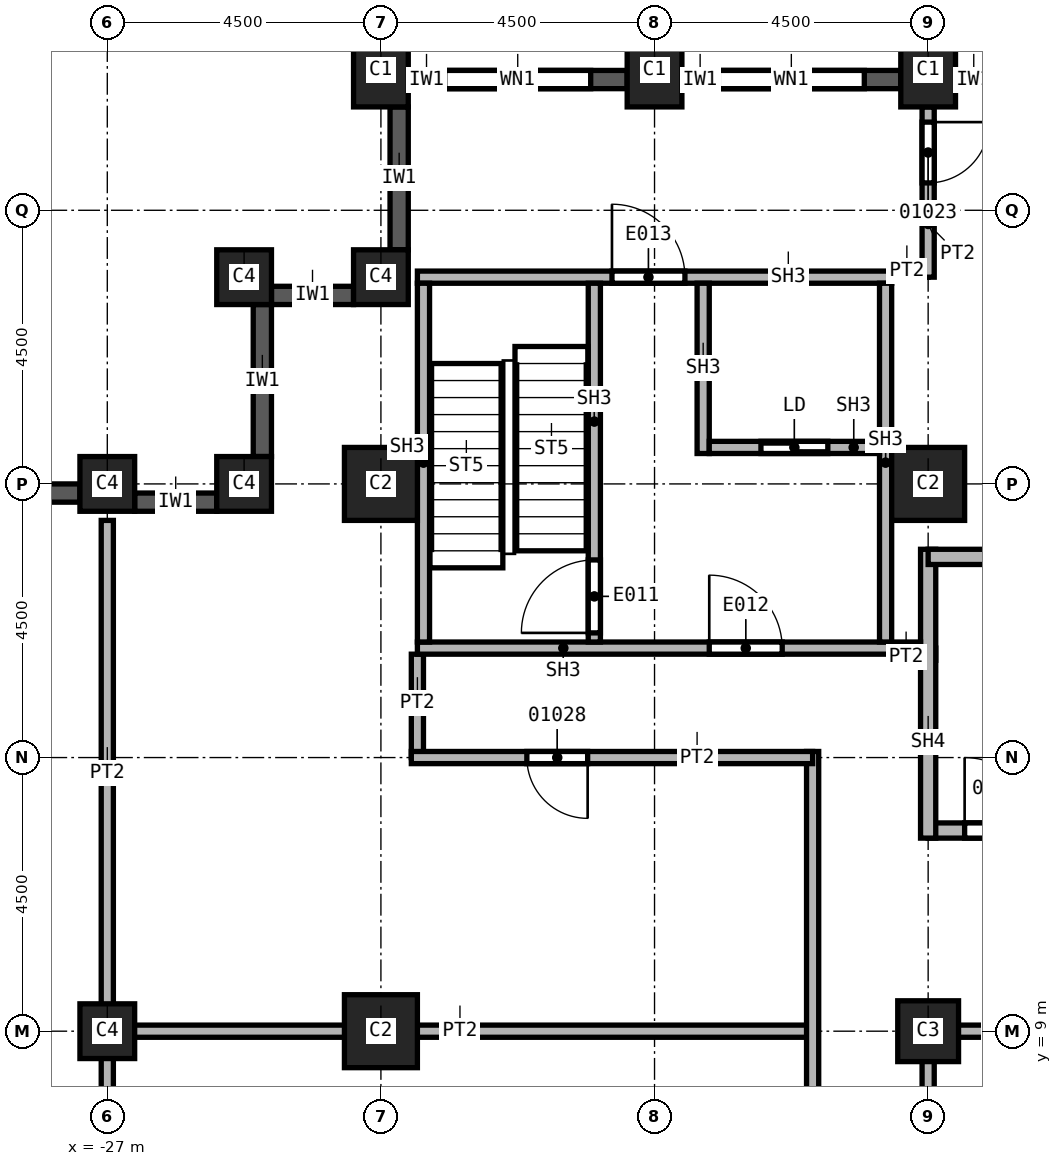
"""IFC4 building model, lengths in metres.
Left out: names, types, materials, properties, quantities, classifications, styles, units other than length and angle.
Written with IfcOpenShell. Run it as: python <this file> out.ifc"""

import sys

from ifc_helpers import new_model, si_unit, direction, frame, frame_2d, origin, origin_2d, place, context, subcontext, project, spatial, rectangle, extrude, element, fill, save


model = new_model("IFC4")
c1 = context("Model", 3, precision=1e-05, world=origin(), true_north=direction((0.0, 1.0)))
c2 = subcontext(c1, "Body", "Model", "MODEL_VIEW")
j1 = project(units=[si_unit("LENGTHUNIT", "METRE"), si_unit("PLANEANGLEUNIT", "RADIAN")], contexts=[c1])
p1 = place(None, origin())
s1 = spatial("IfcSite", under=j1, at=p1, CompositionType="ELEMENT")
p2 = place(p1, origin())
s2 = spatial("IfcBuilding", under=s1, at=p2, CompositionType="ELEMENT")
p3 = place(p2, frame((0.0, 0.0, 72.0)))
s3 = spatial("IfcBuildingStorey", under=s2, at=p3, CompositionType="ELEMENT", Elevation=72.0)
for number, where, z_axis, x_axis in (
    (1, (-13.5, 18.0, 0.0), (0.0, 0.0, 1.0), (1.0, 0.0, 0.0)),
    (2, (-22.5, 9.0, 0.0), (0.0, 0.0, 1.0), (1.0, 0.0, 0.0)),
    (3, (-22.5, 18.0, 0.0), (0.0, 0.0, 1.0), (1.0, 0.0, 0.0)),
):
    element("IfcColumn", number, at=place(p3, frame(where, z_axis=z_axis, x_axis=x_axis)), inside=s3, PredefinedType="COLUMN", context=c2, shape_type="SweptSolid", body=[
        extrude(rectangle(XDim=1.2, YDim=1.2, at=origin_2d()), origin(), (0.0, 0.0, 1.0), 3.7),
    ])
p4 = place(p3, frame((-13.5, 9.0, 0.0), z_axis=(0.0, 0.0, 1.0), x_axis=(1.0, 0.0, 0.0)))
e4 = element("IfcColumn", 4, at=p4, inside=s3, PredefinedType="COLUMN", context=c2, shape_type="SweptSolid", body=[
    extrude(rectangle(XDim=1.0, YDim=1.0, at=origin_2d()), origin(), (0.0, 0.0, 1.0), 3.7),
])
for number, where, z_axis, x_axis in (
    (5, (-13.5, 24.8, 0.0), (0.0, 0.0, 1.0), (1.0, 0.0, 0.0)),
    (6, (-18.0, 24.8, 0.0), (0.0, 0.0, 1.0), (1.0, 0.0, 0.0)),
    (7, (-22.5, 24.8, 0.0), (0.0, 0.0, 1.0), (1.0, 0.0, 0.0)),
):
    element("IfcColumn", number, at=place(p3, frame(where, z_axis=z_axis, x_axis=x_axis)), inside=s3, PredefinedType="COLUMN", context=c2, shape_type="SweptSolid", body=[
        extrude(rectangle(XDim=0.9, YDim=1.2, at=origin_2d()), origin(), (0.0, 0.0, 1.0), 3.7),
    ])
for number, where, z_axis, x_axis in (
    (8, (-27.0, 9.0, 0.0), (0.0, 0.0, 1.0), (1.0, 0.0, 0.0)),
    (9, (-27.0, 18.0, 0.0), (0.0, 0.0, 1.0), (1.0, 0.0, 0.0)),
    (10, (-22.5, 21.4, 0.0), (0.0, 0.0, 1.0), (1.0, 0.0, 0.0)),
    (11, (-24.75, 21.4, 0.0), (0.0, 0.0, 1.0), (1.0, 0.0, 0.0)),
    (12, (-24.75, 18.0, 0.0), (0.0, 0.0, 1.0), (1.0, 0.0, 0.0)),
):
    element("IfcColumn", number, at=place(p3, frame(where, z_axis=z_axis, x_axis=x_axis)), inside=s3, PredefinedType="COLUMN", context=c2, shape_type="SweptSolid", body=[
        extrude(rectangle(XDim=0.9, YDim=0.9, at=origin_2d()), origin(), (0.0, 0.0, 1.0), 3.7),
    ])
p5 = place(p3, frame((-22.2, 24.2, 0.0), z_axis=(0.0, 0.0, 1.0), x_axis=(0.0, -1.0, 0.0)))
e13 = element("IfcWall", 13, at=p5, inside=s3, PredefinedType="SOLIDWALL", context=c2, shape_type="SweptSolid", body=[
    extrude(rectangle(XDim=2.35, YDim=0.3, at=frame_2d((1.175, 0.0))), origin(), (0.0, 0.0, 1.0), 3.1),
])
p6 = place(p3, frame((-22.95, 21.1, 0.0), z_axis=(0.0, 0.0, 1.0), x_axis=(-1.0, 0.0, 0.0)))
e14 = element("IfcWall", 14, at=p6, inside=s3, PredefinedType="SOLIDWALL", context=c2, shape_type="SweptSolid", body=[
    extrude(rectangle(XDim=1.35, YDim=0.3, at=frame_2d((0.675, 0.0))), origin(), (0.0, 0.0, 1.0), 3.1),
])
p7 = place(p3, frame((-24.45, 20.95, 0.0), z_axis=(0.0, 0.0, 1.0), x_axis=(0.0, -1.0, 0.0)))
e15 = element("IfcWall", 15, at=p7, inside=s3, PredefinedType="SOLIDWALL", context=c2, shape_type="SweptSolid", body=[
    extrude(rectangle(XDim=2.5, YDim=0.3, at=frame_2d((1.25, 0.0))), origin(), (0.0, 0.0, 1.0), 3.1),
])
p8 = place(p3, frame((-25.2, 17.7, 0.0), z_axis=(0.0, 0.0, 1.0), x_axis=(-1.0, 0.0, 0.0)))
e16 = element("IfcWall", 16, at=p8, inside=s3, PredefinedType="SOLIDWALL", context=c2, shape_type="SweptSolid", body=[
    extrude(rectangle(XDim=1.35, YDim=0.3, at=frame_2d((0.675, 0.0))), origin(), (0.0, 0.0, 1.0), 3.1),
])
p9 = place(p3, frame((-27.45, 17.85, 0.0), z_axis=(0.0, 0.0, 1.0), x_axis=(-1.0, 0.0, 0.0)))
e17 = element("IfcWall", 17, at=p9, inside=s3, PredefinedType="SOLIDWALL", context=c2, shape_type="SweptSolid", body=[
    extrude(rectangle(XDim=3.6, YDim=0.3, at=frame_2d((1.8, 0.0))), origin(), (0.0, 0.0, 1.0), 3.1),
])
p10 = place(p9, frame((0.6, 0.0, 0.8)))
e18 = element("IfcOpeningElement", 18, at=p10, cuts=e17, PredefinedType="OPENING", context=c2, shape_type="SweptSolid", body=[
    extrude(rectangle(XDim=2.4, YDim=1.95, at=frame_2d((1.2, 0.975))), frame((0.0, 0.15, 0.0), z_axis=(0.0, -1.0, 0.0), x_axis=(1.0, 0.0, 0.0)), (0.0, 0.0, 1.0), 0.3),
])
p11 = place(p3, frame((-9.45, 24.65, 0.0), z_axis=(0.0, 0.0, 1.0), x_axis=(-1.0, 0.0, 0.0)))
e19 = element("IfcWall", 19, at=p11, inside=s3, PredefinedType="SOLIDWALL", context=c2, shape_type="SweptSolid", body=[
    extrude(rectangle(XDim=3.6, YDim=0.3, at=frame_2d((1.8, 0.0))), origin(), (0.0, 0.0, 1.0), 3.1),
])
p12 = place(p11, frame((0.6, 0.0, 0.8)))
e20 = element("IfcOpeningElement", 20, at=p12, cuts=e19, PredefinedType="OPENING", context=c2, shape_type="SweptSolid", body=[
    extrude(rectangle(XDim=2.4, YDim=1.95, at=frame_2d((1.2, 0.975))), frame((0.0, 0.15, 0.0), z_axis=(0.0, -1.0, 0.0), x_axis=(1.0, 0.0, 0.0)), (0.0, 0.0, 1.0), 0.3),
])
p13 = place(p3, frame((-13.95, 24.65, 0.0), z_axis=(0.0, 0.0, 1.0), x_axis=(-1.0, 0.0, 0.0)))
e21 = element("IfcWall", 21, at=p13, inside=s3, PredefinedType="SOLIDWALL", context=c2, shape_type="SweptSolid", body=[
    extrude(rectangle(XDim=3.6, YDim=0.3, at=frame_2d((1.8, 0.0))), origin(), (0.0, 0.0, 1.0), 3.1),
])
p14 = place(p13, frame((0.6, 0.0, 0.8)))
e22 = element("IfcOpeningElement", 22, at=p14, cuts=e21, PredefinedType="OPENING", context=c2, shape_type="SweptSolid", body=[
    extrude(rectangle(XDim=2.4, YDim=1.95, at=frame_2d((1.2, 0.975))), frame((0.0, 0.15, 0.0), z_axis=(0.0, -1.0, 0.0), x_axis=(1.0, 0.0, 0.0)), (0.0, 0.0, 1.0), 0.3),
])
p15 = place(p3, frame((-18.45, 24.65, 0.0), z_axis=(0.0, 0.0, 1.0), x_axis=(-1.0, 0.0, 0.0)))
e23 = element("IfcWall", 23, at=p15, inside=s3, PredefinedType="SOLIDWALL", context=c2, shape_type="SweptSolid", body=[
    extrude(rectangle(XDim=3.6, YDim=0.3, at=frame_2d((1.8, 0.0))), origin(), (0.0, 0.0, 1.0), 3.1),
])
p16 = place(p15, frame((0.6, 0.0, 0.8)))
e24 = element("IfcOpeningElement", 24, at=p16, cuts=e23, PredefinedType="OPENING", context=c2, shape_type="SweptSolid", body=[
    extrude(rectangle(XDim=2.4, YDim=1.95, at=frame_2d((1.2, 0.975))), frame((0.0, 0.15, 0.0), z_axis=(0.0, -1.0, 0.0), x_axis=(1.0, 0.0, 0.0)), (0.0, 0.0, 1.0), 0.3),
])
p17 = place(p3, frame((-27.1, 9.0, 0.0), z_axis=(0.0, 0.0, 1.0), x_axis=(1.0, 0.0, 0.0)))
e25 = element("IfcWall", 25, at=p17, inside=s3, PredefinedType="PARTITIONING", context=c2, shape_type="SweptSolid", body=[
    extrude(rectangle(XDim=11.7, YDim=0.2, at=frame_2d((5.85, 0.0))), origin(), (0.0, 0.0, 1.0), 3.7),
])
p18 = place(p3, frame((-27.0, 3.75, 0.0), z_axis=(0.0, 0.0, 1.0), x_axis=(0.0, 1.0, 0.0)))
e26 = element("IfcWall", 26, at=p18, inside=s3, PredefinedType="PARTITIONING", context=c2, shape_type="SweptSolid", body=[
    extrude(rectangle(XDim=13.65, YDim=0.2, at=frame_2d((6.825, 0.0))), origin(), (0.0, 0.0, 1.0), 3.7),
])
p19 = place(p3, frame((-21.9, 13.5, 0.0), z_axis=(0.0, 0.0, 1.0), x_axis=(0.0, 1.0, 0.0)))
e27 = element("IfcWall", 27, at=p19, inside=s3, PredefinedType="PARTITIONING", context=c2, shape_type="SweptSolid", body=[
    extrude(rectangle(XDim=1.7, YDim=0.2, at=frame_2d((0.85, 0.0))), origin(), (0.0, 0.0, 1.0), 3.7),
])
p20 = place(p3, frame((-15.4, 3.65, 0.0), z_axis=(0.0, 0.0, 1.0), x_axis=(0.0, 1.0, 0.0)))
e28 = element("IfcWall", 28, at=p20, inside=s3, PredefinedType="PARTITIONING", context=c2, shape_type="SweptSolid", body=[
    extrude(rectangle(XDim=9.95, YDim=0.2, at=frame_2d((4.975, 0.0))), origin(), (0.0, 0.0, 1.0), 3.7),
])
p21 = place(p3, frame((-15.4, 13.5, 0.0), z_axis=(0.0, 0.0, 1.0), x_axis=(-1.0, 0.0, 0.0)))
e29 = element("IfcWall", 29, at=p21, inside=s3, PredefinedType="PARTITIONING", context=c2, shape_type="SweptSolid", body=[
    extrude(rectangle(XDim=6.6, YDim=0.2, at=frame_2d((3.3, 0.0))), origin(), (0.0, 0.0, 1.0), 3.7),
])
p22 = place(p21, frame((3.7, 0.0, 0.0)))
e30 = element("IfcOpeningElement", 30, at=p22, cuts=e29, PredefinedType="OPENING", context=c2, shape_type="SweptSolid", body=[
    extrude(rectangle(XDim=1.0, YDim=2.1, at=frame_2d((0.5, 1.05))), frame((0.0, 0.1, 0.0), z_axis=(0.0, -1.0, 0.0), x_axis=(1.0, 0.0, 0.0)), (0.0, 0.0, 1.0), 0.2),
])
p23 = place(p3, frame((-14.1, 15.2, 0.0), z_axis=(0.0, 0.0, 1.0), x_axis=(1.0, 0.0, 0.0)))
e31 = element("IfcWall", 31, at=p23, inside=s3, PredefinedType="PARTITIONING", context=c2, shape_type="SweptSolid", body=[
    extrude(rectangle(XDim=0.725, YDim=0.2, at=frame_2d((0.363, 0.0))), origin(), (0.0, 0.0, 1.0), 3.7),
])
p24 = place(p3, frame((-13.5, 21.5, 0.0), z_axis=(0.0, 0.0, 1.0), x_axis=(-1.0, 0.0, 0.0)))
e32 = element("IfcWall", 32, at=p24, inside=s3, PredefinedType="PARTITIONING", context=c2, shape_type="SweptSolid", body=[
    extrude(rectangle(XDim=0.6, YDim=0.2, at=frame_2d((0.3, 0.0))), origin(), (0.0, 0.0, 1.0), 3.7),
])
p25 = place(p3, frame((-13.5, 24.2, 0.0), z_axis=(0.0, 0.0, 1.0), x_axis=(0.0, -1.0, 0.0)))
e33 = element("IfcWall", 33, at=p25, inside=s3, PredefinedType="PARTITIONING", context=c2, shape_type="SweptSolid", body=[
    extrude(rectangle(XDim=2.8, YDim=0.2, at=frame_2d((1.4, 0.0))), origin(), (0.0, 0.0, 1.0), 3.7),
])
p26 = place(p25, frame((0.25, 0.0, 0.0)))
e34 = element("IfcOpeningElement", 34, at=p26, cuts=e33, PredefinedType="OPENING", context=c2, shape_type="SweptSolid", body=[
    extrude(rectangle(XDim=1.0, YDim=2.1, at=frame_2d((0.5, 1.05))), frame((0.0, 0.1, 0.0), z_axis=(0.0, -1.0, 0.0), x_axis=(1.0, 0.0, 0.0)), (0.0, 0.0, 1.0), 0.2),
])
p27 = place(p3, frame((-13.5, 5.0, 0.0), z_axis=(0.0, 0.0, 1.0), x_axis=(0.0, 1.0, 0.0)))
e35 = element("IfcWall", 35, at=p27, inside=s3, PredefinedType="SOLIDWALL", context=c2, shape_type="SweptSolid", body=[
    extrude(rectangle(XDim=4.1, YDim=0.2, at=frame_2d((2.05, 0.0))), origin(), (0.0, 0.0, 1.0), 2.938),
])
p28 = place(p3, frame((-13.5, 9.0, 0.0), z_axis=(0.0, 0.0, 1.0), x_axis=(1.0, 0.0, 0.0)))
e36 = element("IfcWall", 36, at=p28, inside=s3, PredefinedType="SOLIDWALL", context=c2, shape_type="SweptSolid", body=[
    extrude(rectangle(XDim=3.0, YDim=0.2, at=frame_2d((1.5, 0.0))), origin(), (0.0, 0.0, 1.0), 2.938),
])
p29 = place(p3, frame((-13.5, 12.3, 0.0), z_axis=(0.0, 0.0, 1.0), x_axis=(1.0, 0.0, 0.0)))
e37 = element("IfcWall", 37, at=p29, inside=s3, PredefinedType="SOLIDWALL", context=c2, shape_type="SweptSolid", body=[
    extrude(rectangle(XDim=9.125, YDim=0.25, at=frame_2d((4.562, 0.0))), origin(), (0.0, 0.0, 1.0), 3.7),
])
p30 = place(p29, frame((0.6, 0.0, 0.0)))
e38 = element("IfcOpeningElement", 38, at=p30, cuts=e37, PredefinedType="OPENING", context=c2, shape_type="SweptSolid", body=[
    extrude(rectangle(XDim=1.2, YDim=2.1, at=frame_2d((0.6, 1.05))), frame((0.0, 0.125, 0.0), z_axis=(0.0, -1.0, 0.0), x_axis=(1.0, 0.0, 0.0)), (0.0, 0.0, 1.0), 0.25),
])
p31 = place(p3, frame((-13.5, 12.175, 0.0), z_axis=(0.0, 0.0, 1.0), x_axis=(0.0, 1.0, 0.0)))
e39 = element("IfcWall", 39, at=p31, inside=s3, PredefinedType="SOLIDWALL", context=c2, shape_type="SweptSolid", body=[
    extrude(rectangle(XDim=4.75, YDim=0.25, at=frame_2d((2.375, 0.0))), origin(), (0.0, 0.0, 1.0), 3.7),
])
p32 = place(p3, frame((-13.5, 16.8, 0.0), z_axis=(0.0, 0.0, 1.0), x_axis=(1.0, 0.0, 0.0)))
e40 = element("IfcWall", 40, at=p32, inside=s3, PredefinedType="SOLIDWALL", context=c2, shape_type="SweptSolid", body=[
    extrude(rectangle(XDim=9.125, YDim=0.25, at=frame_2d((4.562, 0.0))), origin(), (0.0, 0.0, 1.0), 3.7),
])
p33 = place(p3, frame((-21.9, 15.3, 0.0), z_axis=(0.0, 0.0, 1.0), x_axis=(1.0, 0.0, 0.0)))
e41 = element("IfcWall", 41, at=p33, inside=s3, PredefinedType="SOLIDWALL", context=c2, shape_type="SweptSolid", body=[
    extrude(rectangle(XDim=8.275, YDim=0.2, at=frame_2d((4.137, 0.0))), origin(), (0.0, 0.0, 1.0), 3.7),
])
p34 = place(p33, frame((4.8, 0.0, 0.0)))
e42 = element("IfcOpeningElement", 42, at=p34, cuts=e41, PredefinedType="OPENING", context=c2, shape_type="SweptSolid", body=[
    extrude(rectangle(XDim=1.2, YDim=2.1, at=frame_2d((0.6, 1.05))), frame((0.0, 0.1, 0.0), z_axis=(0.0, -1.0, 0.0), x_axis=(1.0, 0.0, 0.0)), (0.0, 0.0, 1.0), 0.2),
])
p35 = place(p3, frame((-21.9, 21.4, 0.0), z_axis=(0.0, 0.0, 1.0), x_axis=(1.0, 0.0, 0.0)))
e43 = element("IfcWall", 43, at=p35, inside=s3, PredefinedType="SOLIDWALL", context=c2, shape_type="SweptSolid", body=[
    extrude(rectangle(XDim=7.8, YDim=0.2, at=frame_2d((3.9, 0.0))), origin(), (0.0, 0.0, 1.0), 3.7),
])
p36 = place(p35, frame((3.2, 0.0, 0.0)))
e44 = element("IfcOpeningElement", 44, at=p36, cuts=e43, PredefinedType="OPENING", context=c2, shape_type="SweptSolid", body=[
    extrude(rectangle(XDim=1.2, YDim=2.1, at=frame_2d((0.6, 1.05))), frame((0.0, 0.1, 0.0), z_axis=(0.0, -1.0, 0.0), x_axis=(1.0, 0.0, 0.0)), (0.0, 0.0, 1.0), 0.2),
])
for number, where, z_axis, x_axis in (
    (45, (-21.8, 15.4, 0.0), (0.0, 0.0, 1.0), (0.0, 1.0, 0.0)),
    (46, (-14.2, 15.4, 0.0), (0.0, 0.0, 1.0), (0.0, 1.0, 0.0)),
):
    element("IfcWall", number, at=place(p3, frame(where, z_axis=z_axis, x_axis=x_axis)), inside=s3, PredefinedType="SOLIDWALL", context=c2, shape_type="SweptSolid", body=[
        extrude(rectangle(XDim=5.9, YDim=0.2, at=frame_2d((2.95, 0.0))), origin(), (0.0, 0.0, 1.0), 3.7),
    ])
p37 = place(p3, frame((-18.99, 15.4, 0.0), z_axis=(0.0, 0.0, 1.0), x_axis=(0.0, 1.0, 0.0)))
e47 = element("IfcWall", 47, at=p37, inside=s3, PredefinedType="SOLIDWALL", context=c2, shape_type="SweptSolid", body=[
    extrude(rectangle(XDim=5.9, YDim=0.2, at=frame_2d((2.95, 0.0))), origin(), (0.0, 0.0, 1.0), 3.7),
])
p38 = place(p37, frame((0.15, 0.0, 0.0)))
e48 = element("IfcOpeningElement", 48, at=p38, cuts=e47, PredefinedType="OPENING", context=c2, shape_type="SweptSolid", body=[
    extrude(rectangle(XDim=1.2, YDim=2.1, at=frame_2d((0.6, 1.05))), frame((0.0, 0.1, 0.0), z_axis=(0.0, -1.0, 0.0), x_axis=(1.0, 0.0, 0.0)), (0.0, 0.0, 1.0), 0.2),
])
p39 = place(p3, frame((-17.2, 18.5, 0.0), z_axis=(0.0, 0.0, 1.0), x_axis=(0.0, 1.0, 0.0)))
e49 = element("IfcWall", 49, at=p39, inside=s3, PredefinedType="SOLIDWALL", context=c2, shape_type="SweptSolid", body=[
    extrude(rectangle(XDim=2.8, YDim=0.2, at=frame_2d((1.4, 0.0))), origin(), (0.0, 0.0, 1.0), 3.7),
])
p40 = place(p3, frame((-17.1, 18.6, 0.0), z_axis=(0.0, 0.0, 1.0), x_axis=(1.0, 0.0, 0.0)))
e50 = element("IfcWall", 50, at=p40, inside=s3, PredefinedType="SOLIDWALL", context=c2, shape_type="SweptSolid", body=[
    extrude(rectangle(XDim=2.8, YDim=0.2, at=frame_2d((1.4, 0.0))), origin(), (0.0, 0.0, 1.0), 3.7),
])
p41 = place(p40, frame((0.85, 0.0, 0.0)))
e51 = element("IfcOpeningElement", 51, at=p41, cuts=e50, PredefinedType="OPENING", context=c2, shape_type="SweptSolid", body=[
    extrude(rectangle(XDim=1.1, YDim=2.1, at=frame_2d((0.55, 1.05))), frame((0.0, 0.1, 0.0), z_axis=(0.0, -1.0, 0.0), x_axis=(1.0, 0.0, 0.0)), (0.0, 0.0, 1.0), 0.2),
])
p42 = place(p14, origin())
e52 = element("IfcWindow", 52, at=p42, inside=s3, PartitioningType="SINGLE_PANEL", PredefinedType="WINDOW", context=c2, shape_type="SweptSolid", body=[
    extrude(rectangle(XDim=2.4, YDim=1.95, at=frame_2d((1.2, 0.975))), frame((0.0, 0.03, 0.0), z_axis=(0.0, -1.0, 0.0), x_axis=(1.0, 0.0, 0.0)), (0.0, 0.0, 1.0), 0.06),
])
fill(e22, e52)
p43 = place(p16, origin())
e53 = element("IfcWindow", 53, at=p43, inside=s3, PartitioningType="SINGLE_PANEL", PredefinedType="WINDOW", context=c2, shape_type="SweptSolid", body=[
    extrude(rectangle(XDim=2.4, YDim=1.95, at=frame_2d((1.2, 0.975))), frame((0.0, 0.03, 0.0), z_axis=(0.0, -1.0, 0.0), x_axis=(1.0, 0.0, 0.0)), (0.0, 0.0, 1.0), 0.06),
])
fill(e24, e53)
p44 = place(p30, origin())
e54 = element("IfcDoor", 54, at=p44, inside=s3, OperationType="SINGLE_SWING_RIGHT", PredefinedType="DOOR", context=c2, shape_type="SweptSolid", body=[
    extrude(rectangle(XDim=1.2, YDim=2.1, at=frame_2d((0.6, 1.05))), frame((0.0, 0.025, 0.0), z_axis=(0.0, -1.0, 0.0), x_axis=(1.0, 0.0, 0.0)), (0.0, 0.0, 1.0), 0.05),
])
fill(e38, e54)
p45 = place(p26, origin())
e55 = element("IfcDoor", 55, at=p45, inside=s3, OperationType="SINGLE_SWING_RIGHT", PredefinedType="DOOR", context=c2, shape_type="SweptSolid", body=[
    extrude(rectangle(XDim=1.0, YDim=2.1, at=frame_2d((0.5, 1.05))), frame((0.0, 0.025, 0.0), z_axis=(0.0, -1.0, 0.0), x_axis=(1.0, 0.0, 0.0)), (0.0, 0.0, 1.0), 0.05),
])
fill(e34, e55)
p46 = place(p22, origin())
e56 = element("IfcDoor", 56, at=p46, inside=s3, OperationType="SINGLE_SWING_LEFT", PredefinedType="DOOR", context=c2, shape_type="SweptSolid", body=[
    extrude(rectangle(XDim=1.0, YDim=2.1, at=frame_2d((0.5, 1.05))), frame((0.0, 0.025, 0.0), z_axis=(0.0, -1.0, 0.0), x_axis=(1.0, 0.0, 0.0)), (0.0, 0.0, 1.0), 0.05),
])
fill(e30, e56)
p47 = place(p38, origin())
e57 = element("IfcDoor", 57, at=p47, inside=s3, OperationType="SINGLE_SWING_LEFT", PredefinedType="DOOR", context=c2, shape_type="SweptSolid", body=[
    extrude(rectangle(XDim=1.2, YDim=2.1, at=frame_2d((0.6, 1.05))), frame((0.0, 0.025, 0.0), z_axis=(0.0, -1.0, 0.0), x_axis=(1.0, 0.0, 0.0)), (0.0, 0.0, 1.0), 0.05),
])
fill(e48, e57)
p48 = place(p41, origin())
e58 = element("IfcDoor", 58, at=p48, inside=s3, OperationType="SLIDING_TO_LEFT", PredefinedType="DOOR", context=c2, shape_type="SweptSolid", body=[
    extrude(rectangle(XDim=1.1, YDim=2.1, at=frame_2d((0.55, 1.05))), frame((0.0, 0.025, 0.0), z_axis=(0.0, -1.0, 0.0), x_axis=(1.0, 0.0, 0.0)), (0.0, 0.0, 1.0), 0.05),
])
fill(e51, e58)
p49 = place(p34, origin())
e59 = element("IfcDoor", 59, at=p49, inside=s3, OperationType="SINGLE_SWING_RIGHT", PredefinedType="DOOR", context=c2, shape_type="SweptSolid", body=[
    extrude(rectangle(XDim=1.2, YDim=2.1, at=frame_2d((0.6, 1.05))), frame((0.0, 0.025, 0.0), z_axis=(0.0, -1.0, 0.0), x_axis=(1.0, 0.0, 0.0)), (0.0, 0.0, 1.0), 0.05),
])
fill(e42, e59)
p50 = place(p36, origin())
e60 = element("IfcDoor", 60, at=p50, inside=s3, OperationType="SINGLE_SWING_LEFT", PredefinedType="DOOR", context=c2, shape_type="SweptSolid", body=[
    extrude(rectangle(XDim=1.2, YDim=2.1, at=frame_2d((0.6, 1.05))), frame((0.0, 0.025, 0.0), z_axis=(0.0, -1.0, 0.0), x_axis=(1.0, 0.0, 0.0)), (0.0, 0.0, 1.0), 0.05),
])
fill(e44, e60)
save(model, sys.argv[1])
